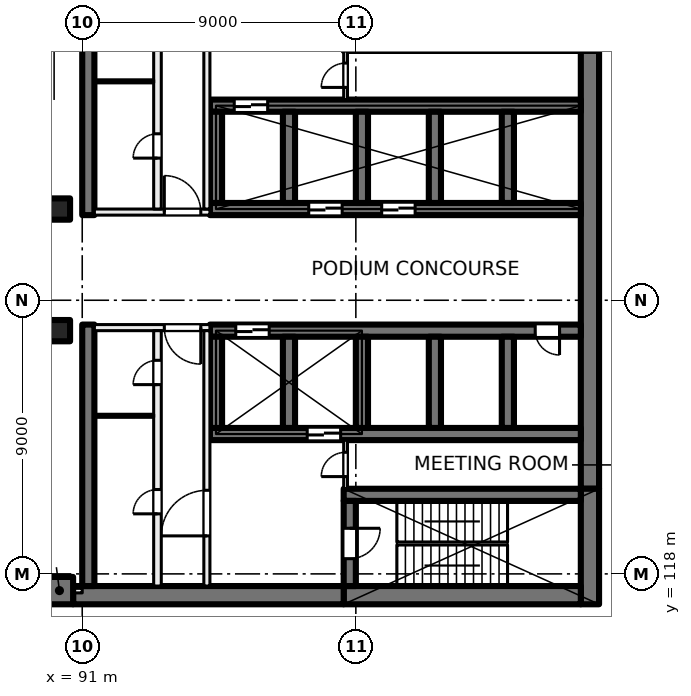
"""IFC4 building model, lengths in metres.
Left out: names, types, materials, properties, quantities, classifications, styles, units other than length and angle.
Written with IfcOpenShell. Run it as: python <this file> out.ifc"""

import sys

from ifc_helpers import new_model, si_unit, direction, frame, frame_2d, origin, origin_2d, place, context, subcontext, project, spatial, rectangle, extrude, element, fill, save


model = new_model("IFC4")
c1 = context("Model", 3, precision=1e-05, world=origin(), true_north=direction((0.0, 1.0)))
c2 = subcontext(c1, "Body", "Model", "MODEL_VIEW")
j1 = project(units=[si_unit("LENGTHUNIT", "METRE"), si_unit("PLANEANGLEUNIT", "RADIAN")], contexts=[c1])
p1 = place(None, origin())
s1 = spatial("IfcSite", under=j1, at=p1, CompositionType="ELEMENT")
p2 = place(p1, origin())
s2 = spatial("IfcBuilding", under=s1, at=p2, CompositionType="ELEMENT")
p3 = place(p2, frame((0.0, 0.0, 7.5)))
s3 = spatial("IfcBuildingStorey", under=s2, at=p3, CompositionType="ELEMENT", Elevation=7.5)
for number, where, z_axis, x_axis in (
    (1, (90.25, 130.0, 0.0), (0.0, 0.0, 1.0), (1.0, 0.0, 0.0)),
    (2, (90.25, 126.0, 0.0), (0.0, 0.0, 1.0), (1.0, 0.0, 0.0)),
):
    element("IfcColumn", number, at=place(p3, frame(where, z_axis=z_axis, x_axis=x_axis)), inside=s3, PredefinedType="COLUMN", context=c2, shape_type="SweptSolid", body=[
        extrude(rectangle(XDim=0.7, YDim=0.7, at=origin_2d()), origin(), (0.0, 0.0, 1.0), 5.0),
    ])
p4 = place(p3, frame((90.25, 117.45, 0.0), z_axis=(0.0, 0.0, 1.0), x_axis=(1.0, 0.0, 0.0)))
e3 = element("IfcColumn", 3, at=p4, inside=s3, PredefinedType="COLUMN", context=c2, shape_type="SweptSolid", body=[
    extrude(rectangle(XDim=0.9, YDim=0.9, at=origin_2d()), origin(), (0.0, 0.0, 1.0), 5.0),
])
p5 = place(p3, frame((107.7, 135.2, 0.0), z_axis=(0.0, 0.0, 1.0), x_axis=(0.0, -1.0, 0.0)))
e4 = element("IfcWall", 4, at=p5, inside=s3, PredefinedType="SHEAR", context=c2, shape_type="SweptSolid", body=[
    extrude(rectangle(XDim=14.4, YDim=0.6, at=frame_2d((7.2, 0.0))), origin(), (0.0, 0.0, 1.0), 5.0),
])
p6 = place(p3, frame((107.7, 120.8, 0.0), z_axis=(0.0, 0.0, 1.0), x_axis=(0.0, -1.0, 0.0)))
e5 = element("IfcWall", 5, at=p6, inside=s3, PredefinedType="SHEAR", context=c2, shape_type="SweptSolid", body=[
    extrude(rectangle(XDim=3.8, YDim=0.6, at=frame_2d((1.9, 0.0))), origin(), (0.0, 0.0, 1.0), 5.0),
])
p7 = place(p3, frame((107.4, 117.3, 0.0), z_axis=(0.0, 0.0, 1.0), x_axis=(-1.0, 0.0, 0.0)))
e6 = element("IfcWall", 6, at=p7, inside=s3, PredefinedType="SHEAR", context=c2, shape_type="SweptSolid", body=[
    extrude(rectangle(XDim=7.8, YDim=0.6, at=frame_2d((3.9, 0.0))), origin(), (0.0, 0.0, 1.0), 5.0),
])
p8 = place(p3, frame((99.6, 117.3, 0.0), z_axis=(0.0, 0.0, 1.0), x_axis=(-1.0, 0.0, 0.0)))
e7 = element("IfcWall", 7, at=p8, inside=s3, PredefinedType="SHEAR", context=c2, shape_type="SweptSolid", body=[
    extrude(rectangle(XDim=8.9, YDim=0.6, at=frame_2d((4.45, 0.0))), origin(), (0.0, 0.0, 1.0), 5.0),
])
p9 = place(p3, frame((107.4, 120.6, 0.0), z_axis=(0.0, 0.0, 1.0), x_axis=(-1.0, 0.0, 0.0)))
e8 = element("IfcWall", 8, at=p9, inside=s3, PredefinedType="SHEAR", context=c2, shape_type="SweptSolid", body=[
    extrude(rectangle(XDim=7.8, YDim=0.4, at=frame_2d((3.9, 0.0))), origin(), (0.0, 0.0, 1.0), 5.0),
])
p10 = place(p3, frame((99.8, 120.4, 0.0), z_axis=(0.0, 0.0, 1.0), x_axis=(0.0, -1.0, 0.0)))
e9 = element("IfcWall", 9, at=p10, inside=s3, PredefinedType="SHEAR", context=c2, shape_type="SweptSolid", body=[
    extrude(rectangle(XDim=2.8, YDim=0.4, at=frame_2d((1.4, 0.0))), origin(), (0.0, 0.0, 1.0), 5.0),
])
p11 = place(p10, frame((0.9, 0.0, 0.0)))
e10 = element("IfcOpeningElement", 10, at=p11, cuts=e9, PredefinedType="OPENING", context=c2, shape_type="SweptSolid", body=[
    extrude(rectangle(XDim=1.0, YDim=2.1, at=frame_2d((0.5, 1.05))), frame((0.0, 0.21, 0.0), z_axis=(0.0, -1.0, 0.0), x_axis=(1.0, 0.0, 0.0)), (0.0, 0.0, 1.0), 0.42),
])
p12 = place(p3, frame((107.4, 130.0, 0.0), z_axis=(0.0, 0.0, 1.0), x_axis=(-1.0, 0.0, 0.0)))
e11 = element("IfcWall", 11, at=p12, inside=s3, PredefinedType="SHEAR", context=c2, shape_type="SweptSolid", body=[
    extrude(rectangle(XDim=12.2, YDim=0.4, at=frame_2d((6.1, 0.0))), origin(), (0.0, 0.0, 1.0), 5.0),
])
p13 = place(p12, frame((5.45, 0.0, 0.0)))
e12 = element("IfcOpeningElement", 12, at=p13, cuts=e11, PredefinedType="OPENING", context=c2, shape_type="SweptSolid", body=[
    extrude(rectangle(XDim=1.1, YDim=2.1, at=frame_2d((0.55, 1.05))), frame((0.0, 0.21, 0.0), z_axis=(0.0, -1.0, 0.0), x_axis=(1.0, 0.0, 0.0)), (0.0, 0.0, 1.0), 0.42),
])
p14 = place(p12, frame((7.85, 0.0, 0.0)))
e13 = element("IfcOpeningElement", 13, at=p14, cuts=e11, PredefinedType="OPENING", context=c2, shape_type="SweptSolid", body=[
    extrude(rectangle(XDim=1.1, YDim=2.1, at=frame_2d((0.55, 1.05))), frame((0.0, 0.21, 0.0), z_axis=(0.0, -1.0, 0.0), x_axis=(1.0, 0.0, 0.0)), (0.0, 0.0, 1.0), 0.42),
])
p15 = place(p3, frame((107.4, 133.4, 0.0), z_axis=(0.0, 0.0, 1.0), x_axis=(-1.0, 0.0, 0.0)))
e14 = element("IfcWall", 14, at=p15, inside=s3, PredefinedType="SHEAR", context=c2, shape_type="SweptSolid", body=[
    extrude(rectangle(XDim=12.2, YDim=0.4, at=frame_2d((6.1, 0.0))), origin(), (0.0, 0.0, 1.0), 5.0),
])
p16 = place(p15, frame((10.3, 0.0, 0.0)))
e15 = element("IfcOpeningElement", 15, at=p16, cuts=e14, PredefinedType="OPENING", context=c2, shape_type="SweptSolid", body=[
    extrude(rectangle(XDim=1.1, YDim=2.1, at=frame_2d((0.55, 1.05))), frame((0.0, 0.21, 0.0), z_axis=(0.0, -1.0, 0.0), x_axis=(1.0, 0.0, 0.0)), (0.0, 0.0, 1.0), 0.42),
])
for number, where, z_axis, x_axis in (
    (16, (105.0, 133.2, 0.0), (0.0, 0.0, 1.0), (0.0, -1.0, 0.0)),
    (17, (102.6, 133.2, 0.0), (0.0, 0.0, 1.0), (0.0, -1.0, 0.0)),
    (18, (100.2, 133.2, 0.0), (0.0, 0.0, 1.0), (0.0, -1.0, 0.0)),
    (19, (97.8, 133.2, 0.0), (0.0, 0.0, 1.0), (0.0, -1.0, 0.0)),
    (20, (95.4, 133.2, 0.0), (0.0, 0.0, 1.0), (0.0, -1.0, 0.0)),
):
    element("IfcWall", number, at=place(p3, frame(where, z_axis=z_axis, x_axis=x_axis)), inside=s3, PredefinedType="SHEAR", context=c2, shape_type="SweptSolid", body=[
        extrude(rectangle(XDim=3.0, YDim=0.4, at=frame_2d((1.5, 0.0))), origin(), (0.0, 0.0, 1.0), 5.0),
    ])
p17 = place(p3, frame((107.4, 126.0, 0.0), z_axis=(0.0, 0.0, 1.0), x_axis=(-1.0, 0.0, 0.0)))
e21 = element("IfcWall", 21, at=p17, inside=s3, PredefinedType="SHEAR", context=c2, shape_type="SweptSolid", body=[
    extrude(rectangle(XDim=12.2, YDim=0.4, at=frame_2d((6.1, 0.0))), origin(), (0.0, 0.0, 1.0), 5.0),
])
p18 = place(p17, frame((10.25, 0.0, 0.0)))
e22 = element("IfcOpeningElement", 22, at=p18, cuts=e21, PredefinedType="OPENING", context=c2, shape_type="SweptSolid", body=[
    extrude(rectangle(XDim=1.1, YDim=2.1, at=frame_2d((0.55, 1.05))), frame((0.0, 0.21, 0.0), z_axis=(0.0, -1.0, 0.0), x_axis=(1.0, 0.0, 0.0)), (0.0, 0.0, 1.0), 0.42),
])
p19 = place(p17, frame((0.7, 0.0, 0.0)))
e23 = element("IfcOpeningElement", 23, at=p19, cuts=e21, PredefinedType="OPENING", context=c2, shape_type="SweptSolid", body=[
    extrude(rectangle(XDim=0.8, YDim=2.1, at=frame_2d((0.4, 1.05))), frame((0.0, 0.21, 0.0), z_axis=(0.0, -1.0, 0.0), x_axis=(1.0, 0.0, 0.0)), (0.0, 0.0, 1.0), 0.42),
])
p20 = place(p3, frame((107.4, 122.6, 0.0), z_axis=(0.0, 0.0, 1.0), x_axis=(-1.0, 0.0, 0.0)))
e24 = element("IfcWall", 24, at=p20, inside=s3, PredefinedType="SHEAR", context=c2, shape_type="SweptSolid", body=[
    extrude(rectangle(XDim=12.2, YDim=0.4, at=frame_2d((6.1, 0.0))), origin(), (0.0, 0.0, 1.0), 5.0),
])
p21 = place(p20, frame((7.9, 0.0, 0.0)))
e25 = element("IfcOpeningElement", 25, at=p21, cuts=e24, PredefinedType="OPENING", context=c2, shape_type="SweptSolid", body=[
    extrude(rectangle(XDim=1.1, YDim=2.1, at=frame_2d((0.55, 1.05))), frame((0.0, 0.21, 0.0), z_axis=(0.0, -1.0, 0.0), x_axis=(1.0, 0.0, 0.0)), (0.0, 0.0, 1.0), 0.42),
])
for number, where, z_axis, x_axis in (
    (26, (105.0, 125.8, 0.0), (0.0, 0.0, 1.0), (0.0, -1.0, 0.0)),
    (27, (102.6, 125.8, 0.0), (0.0, 0.0, 1.0), (0.0, -1.0, 0.0)),
    (28, (100.2, 125.8, 0.0), (0.0, 0.0, 1.0), (0.0, -1.0, 0.0)),
    (29, (97.8, 125.8, 0.0), (0.0, 0.0, 1.0), (0.0, -1.0, 0.0)),
    (30, (95.4, 125.8, 0.0), (0.0, 0.0, 1.0), (0.0, -1.0, 0.0)),
):
    element("IfcWall", number, at=place(p3, frame(where, z_axis=z_axis, x_axis=x_axis)), inside=s3, PredefinedType="SHEAR", context=c2, shape_type="SweptSolid", body=[
        extrude(rectangle(XDim=3.0, YDim=0.4, at=frame_2d((1.5, 0.0))), origin(), (0.0, 0.0, 1.0), 5.0),
    ])
for number, where, z_axis, x_axis in (
    (31, (91.2, 138.4, 0.0), (0.0, 0.0, 1.0), (0.0, -1.0, 0.0)),
    (32, (91.2, 126.2, 0.0), (0.0, 0.0, 1.0), (0.0, -1.0, 0.0)),
):
    element("IfcWall", number, at=place(p3, frame(where, z_axis=z_axis, x_axis=x_axis)), inside=s3, PredefinedType="SHEAR", context=c2, shape_type="SweptSolid", body=[
        extrude(rectangle(XDim=8.6, YDim=0.4, at=frame_2d((4.3, 0.0))), origin(), (0.0, 0.0, 1.0), 5.0),
    ])
p22 = place(p3, frame((95.2, 126.1, 0.0), z_axis=(0.0, 0.0, 1.0), x_axis=(-1.0, 0.0, 0.0)))
e33 = element("IfcWall", 33, at=p22, inside=s3, PredefinedType="PARTITIONING", context=c2, shape_type="SweptSolid", body=[
    extrude(rectangle(XDim=3.8, YDim=0.2, at=frame_2d((1.9, 0.0))), origin(), (0.0, 0.0, 1.0), 4.6),
])
p23 = place(p22, frame((0.3, 0.0, 0.0)))
e34 = element("IfcOpeningElement", 34, at=p23, cuts=e33, PredefinedType="OPENING", context=c2, shape_type="SweptSolid", body=[
    extrude(rectangle(XDim=1.2, YDim=2.1, at=frame_2d((0.6, 1.05))), frame((0.0, 0.11, 0.0), z_axis=(0.0, -1.0, 0.0), x_axis=(1.0, 0.0, 0.0)), (0.0, 0.0, 1.0), 0.22),
])
p24 = place(p3, frame((95.1, 117.6, 0.0), z_axis=(0.0, 0.0, 1.0), x_axis=(0.0, 1.0, 0.0)))
e35 = element("IfcWall", 35, at=p24, inside=s3, PredefinedType="PARTITIONING", context=c2, shape_type="SweptSolid", body=[
    extrude(rectangle(XDim=8.4, YDim=0.2, at=frame_2d((4.2, 0.0))), origin(), (0.0, 0.0, 1.0), 4.6),
])
p25 = place(p24, frame((1.65, 0.0, 0.0)))
e36 = element("IfcOpeningElement", 36, at=p25, cuts=e35, PredefinedType="OPENING", context=c2, shape_type="SweptSolid", body=[
    extrude(rectangle(XDim=1.5, YDim=2.1, at=frame_2d((0.75, 1.05))), frame((0.0, 0.11, 0.0), z_axis=(0.0, -1.0, 0.0), x_axis=(1.0, 0.0, 0.0)), (0.0, 0.0, 1.0), 0.22),
])
p26 = place(p3, frame((93.475, 117.6, 0.0), z_axis=(0.0, 0.0, 1.0), x_axis=(0.0, 1.0, 0.0)))
e37 = element("IfcWall", 37, at=p26, inside=s3, PredefinedType="PARTITIONING", context=c2, shape_type="SweptSolid", body=[
    extrude(rectangle(XDim=8.4, YDim=0.25, at=frame_2d((4.2, 0.0))), origin(), (0.0, 0.0, 1.0), 4.6),
])
p27 = place(p26, frame((6.625, 0.0, 0.0)))
e38 = element("IfcOpeningElement", 38, at=p27, cuts=e37, PredefinedType="OPENING", context=c2, shape_type="SweptSolid", body=[
    extrude(rectangle(XDim=0.8, YDim=2.1, at=frame_2d((0.4, 1.05))), frame((0.0, 0.135, 0.0), z_axis=(0.0, -1.0, 0.0), x_axis=(1.0, 0.0, 0.0)), (0.0, 0.0, 1.0), 0.27),
])
p28 = place(p26, frame((2.375, 0.0, 0.0)))
e39 = element("IfcOpeningElement", 39, at=p28, cuts=e37, PredefinedType="OPENING", context=c2, shape_type="SweptSolid", body=[
    extrude(rectangle(XDim=0.8, YDim=2.1, at=frame_2d((0.4, 1.05))), frame((0.0, 0.135, 0.0), z_axis=(0.0, -1.0, 0.0), x_axis=(1.0, 0.0, 0.0)), (0.0, 0.0, 1.0), 0.27),
])
p29 = place(p3, frame((99.663, 120.8, 0.0), z_axis=(0.0, 0.0, 1.0), x_axis=(0.0, 1.0, 0.0)))
e40 = element("IfcWall", 40, at=p29, inside=s3, PredefinedType="PARTITIONING", context=c2, shape_type="SweptSolid", body=[
    extrude(rectangle(XDim=1.6, YDim=0.125, at=frame_2d((0.8, 0.0))), origin(), (0.0, 0.0, 1.0), 4.6),
])
p30 = place(p29, frame((0.4, 0.0, 0.0)))
e41 = element("IfcOpeningElement", 41, at=p30, cuts=e40, PredefinedType="OPENING", context=c2, shape_type="SweptSolid", body=[
    extrude(rectangle(XDim=0.8, YDim=2.1, at=frame_2d((0.4, 1.05))), frame((0.0, 0.073, 0.0), z_axis=(0.0, -1.0, 0.0), x_axis=(1.0, 0.0, 0.0)), (0.0, 0.0, 1.0), 0.145),
])
p31 = place(p3, frame((93.35, 123.2, 0.0), z_axis=(0.0, 0.0, 1.0), x_axis=(-1.0, 0.0, 0.0)))
e42 = element("IfcWall", 42, at=p31, inside=s3, PredefinedType="PARTITIONING", context=c2, shape_type="SweptSolid", body=[
    extrude(rectangle(XDim=1.95, YDim=0.1, at=frame_2d((0.975, 0.0))), origin(), (0.0, 0.0, 1.0), 4.6),
])
p32 = place(p3, frame((91.4, 129.9, 0.0), z_axis=(0.0, 0.0, 1.0), x_axis=(1.0, 0.0, 0.0)))
e43 = element("IfcWall", 43, at=p32, inside=s3, PredefinedType="PARTITIONING", context=c2, shape_type="SweptSolid", body=[
    extrude(rectangle(XDim=3.8, YDim=0.2, at=frame_2d((1.9, 0.0))), origin(), (0.0, 0.0, 1.0), 4.6),
])
p33 = place(p32, frame((2.3, 0.0, 0.0)))
e44 = element("IfcOpeningElement", 44, at=p33, cuts=e43, PredefinedType="OPENING", context=c2, shape_type="SweptSolid", body=[
    extrude(rectangle(XDim=1.2, YDim=2.1, at=frame_2d((0.6, 1.05))), frame((0.0, 0.11, 0.0), z_axis=(0.0, -1.0, 0.0), x_axis=(1.0, 0.0, 0.0)), (0.0, 0.0, 1.0), 0.22),
])
p34 = place(p3, frame((95.1, 130.0, 0.0), z_axis=(0.0, 0.0, 1.0), x_axis=(0.0, 1.0, 0.0)))
e45 = element("IfcWall", 45, at=p34, inside=s3, PredefinedType="PARTITIONING", context=c2, shape_type="SweptSolid", body=[
    extrude(rectangle(XDim=8.4, YDim=0.2, at=frame_2d((4.2, 0.0))), origin(), (0.0, 0.0, 1.0), 4.6),
])
p35 = place(p34, frame((5.25, 0.0, 0.0)))
e46 = element("IfcOpeningElement", 46, at=p35, cuts=e45, PredefinedType="OPENING", context=c2, shape_type="SweptSolid", body=[
    extrude(rectangle(XDim=1.5, YDim=2.1, at=frame_2d((0.75, 1.05))), frame((0.0, 0.11, 0.0), z_axis=(0.0, -1.0, 0.0), x_axis=(1.0, 0.0, 0.0)), (0.0, 0.0, 1.0), 0.22),
])
p36 = place(p3, frame((93.475, 130.0, 0.0), z_axis=(0.0, 0.0, 1.0), x_axis=(0.0, 1.0, 0.0)))
e47 = element("IfcWall", 47, at=p36, inside=s3, PredefinedType="PARTITIONING", context=c2, shape_type="SweptSolid", body=[
    extrude(rectangle(XDim=8.4, YDim=0.25, at=frame_2d((4.2, 0.0))), origin(), (0.0, 0.0, 1.0), 4.6),
])
p37 = place(p36, frame((1.675, 0.0, 0.0)))
e48 = element("IfcOpeningElement", 48, at=p37, cuts=e47, PredefinedType="OPENING", context=c2, shape_type="SweptSolid", body=[
    extrude(rectangle(XDim=0.8, YDim=2.1, at=frame_2d((0.4, 1.05))), frame((0.0, 0.135, 0.0), z_axis=(0.0, -1.0, 0.0), x_axis=(1.0, 0.0, 0.0)), (0.0, 0.0, 1.0), 0.27),
])
p38 = place(p36, frame((5.925, 0.0, 0.0)))
e49 = element("IfcOpeningElement", 49, at=p38, cuts=e47, PredefinedType="OPENING", context=c2, shape_type="SweptSolid", body=[
    extrude(rectangle(XDim=0.8, YDim=2.1, at=frame_2d((0.4, 1.05))), frame((0.0, 0.135, 0.0), z_axis=(0.0, -1.0, 0.0), x_axis=(1.0, 0.0, 0.0)), (0.0, 0.0, 1.0), 0.27),
])
p39 = place(p3, frame((99.663, 133.6, 0.0), z_axis=(0.0, 0.0, 1.0), x_axis=(0.0, 1.0, 0.0)))
e50 = element("IfcWall", 50, at=p39, inside=s3, PredefinedType="PARTITIONING", context=c2, shape_type="SweptSolid", body=[
    extrude(rectangle(XDim=1.6, YDim=0.125, at=frame_2d((0.8, 0.0))), origin(), (0.0, 0.0, 1.0), 4.6),
])
p40 = place(p39, frame((0.4, 0.0, 0.0)))
e51 = element("IfcOpeningElement", 51, at=p40, cuts=e50, PredefinedType="OPENING", context=c2, shape_type="SweptSolid", body=[
    extrude(rectangle(XDim=0.8, YDim=2.1, at=frame_2d((0.4, 1.05))), frame((0.0, 0.073, 0.0), z_axis=(0.0, -1.0, 0.0), x_axis=(1.0, 0.0, 0.0)), (0.0, 0.0, 1.0), 0.145),
])
p41 = place(p3, frame((91.4, 134.2, 0.0), z_axis=(0.0, 0.0, 1.0), x_axis=(1.0, 0.0, 0.0)))
e52 = element("IfcWall", 52, at=p41, inside=s3, PredefinedType="PARTITIONING", context=c2, shape_type="SweptSolid", body=[
    extrude(rectangle(XDim=1.95, YDim=0.1, at=frame_2d((0.975, 0.0))), origin(), (0.0, 0.0, 1.0), 4.6),
])
p42 = place(p3, frame((91.0, 117.45, 0.0), z_axis=(0.0, 0.0, 1.0), x_axis=(-1.0, 0.0, 0.0)))
e53 = element("IfcWall", 53, at=p42, inside=s3, PredefinedType="PARTITIONING", context=c2, shape_type="SweptSolid", body=[
    extrude(rectangle(XDim=41.175, YDim=0.15, at=frame_2d((20.587, 0.0))), origin(), (0.0, 0.0, 1.0), 4.6),
])
p43 = place(p42, frame((11.5, 0.0, 0.0)))
e54 = element("IfcOpeningElement", 54, at=p43, cuts=e53, PredefinedType="OPENING", context=c2, shape_type="SweptSolid", body=[
    extrude(rectangle(XDim=1.0, YDim=2.1, at=frame_2d((0.5, 1.05))), frame((0.0, 0.085, 0.0), z_axis=(0.0, -1.0, 0.0), x_axis=(1.0, 0.0, 0.0)), (0.0, 0.0, 1.0), 0.17),
])
p44 = place(p18, origin())
e55 = element("IfcDoor", 55, at=p44, inside=s3, OperationType="DOUBLE_DOOR_SLIDING", PredefinedType="DOOR", context=c2, shape_type="SweptSolid", body=[
    extrude(rectangle(XDim=1.1, YDim=2.1, at=frame_2d((0.55, 1.05))), frame((0.0, 0.025, 0.0), z_axis=(0.0, -1.0, 0.0), x_axis=(1.0, 0.0, 0.0)), (0.0, 0.0, 1.0), 0.05),
])
fill(e22, e55)
p45 = place(p13, origin())
e56 = element("IfcDoor", 56, at=p45, inside=s3, OperationType="DOUBLE_DOOR_SLIDING", PredefinedType="DOOR", context=c2, shape_type="SweptSolid", body=[
    extrude(rectangle(XDim=1.1, YDim=2.1, at=frame_2d((0.55, 1.05))), frame((0.0, 0.025, 0.0), z_axis=(0.0, -1.0, 0.0), x_axis=(1.0, 0.0, 0.0)), (0.0, 0.0, 1.0), 0.05),
])
fill(e12, e56)
p46 = place(p14, origin())
e57 = element("IfcDoor", 57, at=p46, inside=s3, OperationType="DOUBLE_DOOR_SLIDING", PredefinedType="DOOR", context=c2, shape_type="SweptSolid", body=[
    extrude(rectangle(XDim=1.1, YDim=2.1, at=frame_2d((0.55, 1.05))), frame((0.0, 0.025, 0.0), z_axis=(0.0, -1.0, 0.0), x_axis=(1.0, 0.0, 0.0)), (0.0, 0.0, 1.0), 0.05),
])
fill(e13, e57)
p47 = place(p19, origin())
e58 = element("IfcDoor", 58, at=p47, inside=s3, OperationType="SINGLE_SWING_LEFT", PredefinedType="DOOR", context=c2, shape_type="SweptSolid", body=[
    extrude(rectangle(XDim=0.8, YDim=2.1, at=frame_2d((0.4, 1.05))), frame((0.0, 0.025, 0.0), z_axis=(0.0, -1.0, 0.0), x_axis=(1.0, 0.0, 0.0)), (0.0, 0.0, 1.0), 0.05),
])
fill(e23, e58)
p48 = place(p23, origin())
e59 = element("IfcDoor", 59, at=p48, inside=s3, OperationType="DOUBLE_DOOR_SINGLE_SWING", PredefinedType="DOOR", context=c2, shape_type="SweptSolid", body=[
    extrude(rectangle(XDim=1.2, YDim=2.1, at=frame_2d((0.6, 1.05))), frame((0.0, 0.025, 0.0), z_axis=(0.0, -1.0, 0.0), x_axis=(1.0, 0.0, 0.0)), (0.0, 0.0, 1.0), 0.05),
])
fill(e34, e59)
p49 = place(p25, origin())
e60 = element("IfcDoor", 60, at=p49, inside=s3, OperationType="DOUBLE_DOOR_SINGLE_SWING", PredefinedType="DOOR", context=c2, shape_type="SweptSolid", body=[
    extrude(rectangle(XDim=1.5, YDim=2.1, at=frame_2d((0.75, 1.05))), frame((0.0, 0.025, 0.0), z_axis=(0.0, -1.0, 0.0), x_axis=(1.0, 0.0, 0.0)), (0.0, 0.0, 1.0), 0.05),
])
fill(e36, e60)
p50 = place(p11, origin())
e61 = element("IfcDoor", 61, at=p50, inside=s3, OperationType="SINGLE_SWING_LEFT", PredefinedType="DOOR", context=c2, shape_type="SweptSolid", body=[
    extrude(rectangle(XDim=1.0, YDim=2.1, at=frame_2d((0.5, 1.05))), frame((0.0, 0.025, 0.0), z_axis=(0.0, -1.0, 0.0), x_axis=(1.0, 0.0, 0.0)), (0.0, 0.0, 1.0), 0.05),
])
fill(e10, e61)
p51 = place(p30, origin())
e62 = element("IfcDoor", 62, at=p51, inside=s3, OperationType="SINGLE_SWING_RIGHT", PredefinedType="DOOR", context=c2, shape_type="SweptSolid", body=[
    extrude(rectangle(XDim=0.8, YDim=2.1, at=frame_2d((0.4, 1.05))), frame((0.0, 0.025, 0.0), z_axis=(0.0, -1.0, 0.0), x_axis=(1.0, 0.0, 0.0)), (0.0, 0.0, 1.0), 0.05),
])
fill(e41, e62)
p52 = place(p27, origin())
e63 = element("IfcDoor", 63, at=p52, inside=s3, OperationType="SINGLE_SWING_LEFT", PredefinedType="DOOR", context=c2, shape_type="SweptSolid", body=[
    extrude(rectangle(XDim=0.8, YDim=2.1, at=frame_2d((0.4, 1.05))), frame((0.0, 0.025, 0.0), z_axis=(0.0, -1.0, 0.0), x_axis=(1.0, 0.0, 0.0)), (0.0, 0.0, 1.0), 0.05),
])
fill(e38, e63)
p53 = place(p28, origin())
e64 = element("IfcDoor", 64, at=p53, inside=s3, OperationType="SINGLE_SWING_RIGHT", PredefinedType="DOOR", context=c2, shape_type="SweptSolid", body=[
    extrude(rectangle(XDim=0.8, YDim=2.1, at=frame_2d((0.4, 1.05))), frame((0.0, 0.025, 0.0), z_axis=(0.0, -1.0, 0.0), x_axis=(1.0, 0.0, 0.0)), (0.0, 0.0, 1.0), 0.05),
])
fill(e39, e64)
p54 = place(p33, origin())
e65 = element("IfcDoor", 65, at=p54, inside=s3, OperationType="DOUBLE_DOOR_SINGLE_SWING", PredefinedType="DOOR", context=c2, shape_type="SweptSolid", body=[
    extrude(rectangle(XDim=1.2, YDim=2.1, at=frame_2d((0.6, 1.05))), frame((0.0, 0.025, 0.0), z_axis=(0.0, -1.0, 0.0), x_axis=(1.0, 0.0, 0.0)), (0.0, 0.0, 1.0), 0.05),
])
fill(e44, e65)
p55 = place(p40, origin())
e66 = element("IfcDoor", 66, at=p55, inside=s3, OperationType="SINGLE_SWING_LEFT", PredefinedType="DOOR", context=c2, shape_type="SweptSolid", body=[
    extrude(rectangle(XDim=0.8, YDim=2.1, at=frame_2d((0.4, 1.05))), frame((0.0, 0.025, 0.0), z_axis=(0.0, -1.0, 0.0), x_axis=(1.0, 0.0, 0.0)), (0.0, 0.0, 1.0), 0.05),
])
fill(e51, e66)
p56 = place(p37, origin())
e67 = element("IfcDoor", 67, at=p56, inside=s3, OperationType="SINGLE_SWING_RIGHT", PredefinedType="DOOR", context=c2, shape_type="SweptSolid", body=[
    extrude(rectangle(XDim=0.8, YDim=2.1, at=frame_2d((0.4, 1.05))), frame((0.0, 0.025, 0.0), z_axis=(0.0, -1.0, 0.0), x_axis=(1.0, 0.0, 0.0)), (0.0, 0.0, 1.0), 0.05),
])
fill(e48, e67)
p57 = place(p16, origin())
e68 = element("IfcDoor", 68, at=p57, inside=s3, OperationType="DOUBLE_DOOR_SLIDING", PredefinedType="DOOR", context=c2, shape_type="SweptSolid", body=[
    extrude(rectangle(XDim=1.1, YDim=2.1, at=frame_2d((0.55, 1.05))), frame((0.0, 0.025, 0.0), z_axis=(0.0, -1.0, 0.0), x_axis=(1.0, 0.0, 0.0)), (0.0, 0.0, 1.0), 0.05),
])
fill(e15, e68)
p58 = place(p21, origin())
e69 = element("IfcDoor", 69, at=p58, inside=s3, OperationType="DOUBLE_DOOR_SLIDING", PredefinedType="DOOR", context=c2, shape_type="SweptSolid", body=[
    extrude(rectangle(XDim=1.1, YDim=2.1, at=frame_2d((0.55, 1.05))), frame((0.0, 0.025, 0.0), z_axis=(0.0, -1.0, 0.0), x_axis=(1.0, 0.0, 0.0)), (0.0, 0.0, 1.0), 0.05),
])
fill(e25, e69)
save(model, sys.argv[1])
